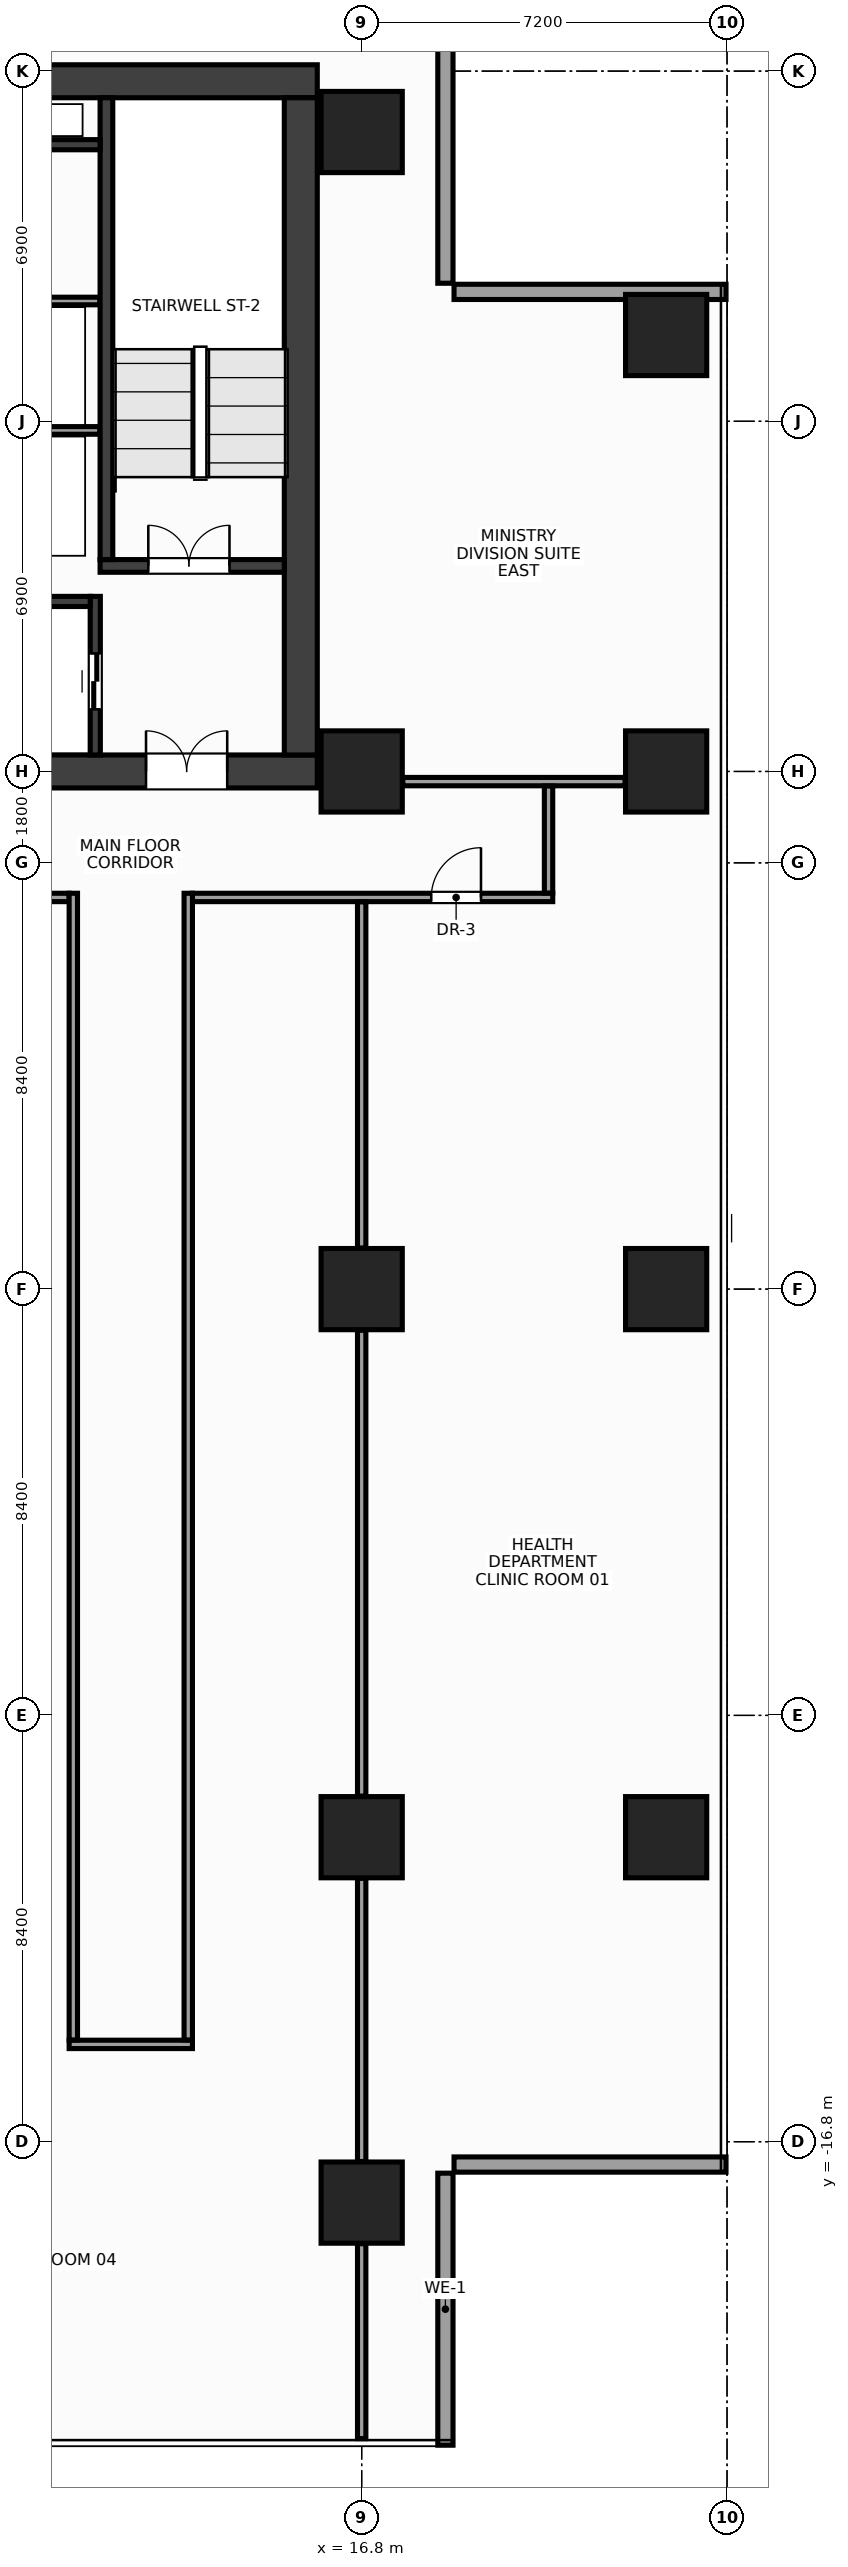
"""IFC4 building model, lengths in metres.
Left out: names, types, materials, properties, quantities, classifications, styles, units other than length and angle.
Written with IfcOpenShell. Run it as: python <this file> out.ifc"""

import sys

from ifc_helpers import new_model, si_unit, direction, frame, frame_2d, origin, origin_2d, place, context, subcontext, project, spatial, rectangle, extrude, source, transform, mapped, element, fill, save


model = new_model("IFC4")
c1 = context("Model", 3, precision=1e-05, world=origin(), true_north=direction((0.0, 1.0)))
c2 = subcontext(c1, "Body", "Model", "MODEL_VIEW")
j1 = project(units=[si_unit("LENGTHUNIT", "METRE"), si_unit("PLANEANGLEUNIT", "RADIAN")], contexts=[c1])
p1 = place(None, origin())
s1 = spatial("IfcSite", under=j1, at=p1, CompositionType="ELEMENT")
p2 = place(p1, origin())
s2 = spatial("IfcBuilding", under=s1, at=p2, CompositionType="ELEMENT")
p3 = place(p2, frame((0.0, 0.0, 156.8)))
s3 = spatial("IfcBuildingStorey", under=s2, at=p3, CompositionType="ELEMENT", Elevation=156.8)
m1 = source(origin(), c2, "Body", "SweptSolid", [
    extrude(rectangle(XDim=31.85, YDim=0.65, at=frame_2d((15.925, 0.0))), origin(), (0.0, 0.0, 1.0), 3.6),
])
p4 = place(p3, frame((-15.925, 23.8, 0.0), z_axis=(0.0, 0.0, 1.0), x_axis=(1.0, 0.0, 0.0)))
e1 = element("IfcWall", 1, at=p4, inside=s3, PredefinedType="SHEAR", context=c2, shape_type="MappedRepresentation", body=[
    mapped(m1, transform((0.0, 0.0, 0.0), x_axis=(1.0, 0.0, 0.0), y_axis=(0.0, 1.0, 0.0), z_axis=(0.0, 0.0, 1.0), scale=1.0)),
])
p5 = place(p3, frame((-15.925, 10.2, 0.0), z_axis=(0.0, 0.0, 1.0), x_axis=(1.0, 0.0, 0.0)))
e2 = element("IfcWall", 2, at=p5, inside=s3, PredefinedType="SHEAR", context=c2, shape_type="MappedRepresentation", body=[
    mapped(m1, transform((0.0, 0.0, 0.0), x_axis=(1.0, 0.0, 0.0), y_axis=(0.0, 1.0, 0.0), z_axis=(0.0, 0.0, 1.0), scale=1.0)),
])
p6 = place(p5, frame((1.775, 0.0, 0.0)))
e3 = element("IfcOpeningElement", 3, at=p6, cuts=e2, PredefinedType="OPENING", context=c2, shape_type="SweptSolid", body=[
    extrude(rectangle(XDim=1.6, YDim=2.15, at=frame_2d((0.8, 1.075))), frame((0.0, 0.337, 0.0), z_axis=(0.0, -1.0, 0.0), x_axis=(1.0, 0.0, 0.0)), (0.0, 0.0, 1.0), 0.674),
])
p7 = place(p5, frame((28.475, 0.0, 0.0)))
e4 = element("IfcOpeningElement", 4, at=p7, cuts=e2, PredefinedType="OPENING", context=c2, shape_type="SweptSolid", body=[
    extrude(rectangle(XDim=1.6, YDim=2.15, at=frame_2d((0.8, 1.075))), frame((0.0, 0.337, 0.0), z_axis=(0.0, -1.0, 0.0), x_axis=(1.0, 0.0, 0.0)), (0.0, 0.0, 1.0), 0.674),
])
p8 = place(p5, frame((15.175, 0.0, 0.0)))
e5 = element("IfcOpeningElement", 5, at=p8, cuts=e2, PredefinedType="OPENING", context=c2, shape_type="SweptSolid", body=[
    extrude(rectangle(XDim=1.5, YDim=2.2, at=frame_2d((0.75, 1.1))), frame((0.0, 0.337, 0.0), z_axis=(0.0, -1.0, 0.0), x_axis=(1.0, 0.0, 0.0)), (0.0, 0.0, 1.0), 0.674),
])
m2 = source(origin(), c2, "Body", "SweptSolid", [
    extrude(rectangle(XDim=12.95, YDim=0.65, at=frame_2d((6.475, 0.0))), origin(), (0.0, 0.0, 1.0), 3.6),
])
p9 = place(p3, frame((15.6, 10.525, 0.0), z_axis=(0.0, 0.0, 1.0), x_axis=(0.0, 1.0, 0.0)))
e6 = element("IfcWall", 6, at=p9, inside=s3, PredefinedType="SHEAR", context=c2, shape_type="MappedRepresentation", body=[
    mapped(m2, transform((0.0, 0.0, 0.0), x_axis=(1.0, 0.0, 0.0), y_axis=(0.0, 1.0, 0.0), z_axis=(0.0, 0.0, 1.0), scale=1.0)),
])
m3 = source(origin(), c2, "Body", "SweptSolid", [
    extrude(rectangle(XDim=3.63, YDim=0.25, at=frame_2d((1.815, 0.0))), origin(), (0.0, 0.0, 1.0), 3.6),
])
p10 = place(p3, frame((11.645, 14.25, 0.0), z_axis=(0.0, 0.0, 1.0), x_axis=(1.0, 0.0, 0.0)))
e7 = element("IfcWall", 7, at=p10, inside=s3, PredefinedType="SHEAR", context=c2, shape_type="MappedRepresentation", body=[
    mapped(m3, transform((0.0, 0.0, 0.0), x_axis=(1.0, 0.0, 0.0), y_axis=(0.0, 1.0, 0.0), z_axis=(0.0, 0.0, 1.0), scale=1.0)),
])
p11 = place(p10, frame((0.95, 0.0, 0.0)))
e8 = element("IfcOpeningElement", 8, at=p11, cuts=e7, PredefinedType="OPENING", context=c2, shape_type="SweptSolid", body=[
    extrude(rectangle(XDim=1.6, YDim=2.15, at=frame_2d((0.8, 1.075))), frame((0.0, 0.137, 0.0), z_axis=(0.0, -1.0, 0.0), x_axis=(1.0, 0.0, 0.0)), (0.0, 0.0, 1.0), 0.274),
])
m4 = source(origin(), c2, "Body", "SweptSolid", [
    extrude(rectangle(XDim=9.1, YDim=0.25, at=frame_2d((4.55, 0.0))), origin(), (0.0, 0.0, 1.0), 3.6),
])
p12 = place(p3, frame((11.77, 14.375, 0.0), z_axis=(0.0, 0.0, 1.0), x_axis=(0.0, 1.0, 0.0)))
e9 = element("IfcWall", 9, at=p12, inside=s3, PredefinedType="SHEAR", context=c2, shape_type="MappedRepresentation", body=[
    mapped(m4, transform((0.0, 0.0, 0.0), x_axis=(1.0, 0.0, 0.0), y_axis=(0.0, 1.0, 0.0), z_axis=(0.0, 0.0, 1.0), scale=1.0)),
])
m5 = source(origin(), c2, "Body", "SweptSolid", [
    extrude(rectangle(XDim=3.125, YDim=0.2, at=frame_2d((1.562, 0.0))), origin(), (0.0, 0.0, 1.0), 3.6),
])
p13 = place(p3, frame((11.55, 10.525, 0.0), z_axis=(0.0, 0.0, 1.0), x_axis=(0.0, 1.0, 0.0)))
e10 = element("IfcWall", 10, at=p13, inside=s3, PredefinedType="SHEAR", context=c2, shape_type="MappedRepresentation", body=[
    mapped(m5, transform((0.0, 0.0, 0.0), x_axis=(1.0, 0.0, 0.0), y_axis=(0.0, 1.0, 0.0), z_axis=(0.0, 0.0, 1.0), scale=1.0)),
])
p14 = place(p13, frame((0.9, 0.0, 0.0)))
e11 = element("IfcOpeningElement", 11, at=p14, cuts=e10, PredefinedType="OPENING", context=c2, shape_type="SweptSolid", body=[
    extrude(rectangle(XDim=1.1, YDim=2.15, at=frame_2d((0.55, 1.075))), frame((0.0, 0.112, 0.0), z_axis=(0.0, -1.0, 0.0), x_axis=(1.0, 0.0, 0.0)), (0.0, 0.0, 1.0), 0.224),
])
m6 = source(origin(), c2, "Body", "SweptSolid", [
    extrude(rectangle(XDim=2.825, YDim=0.2, at=frame_2d((1.413, 0.0))), origin(), (0.0, 0.0, 1.0), 3.6),
])
p15 = place(p3, frame((8.625, 13.55, 0.0), z_axis=(0.0, 0.0, 1.0), x_axis=(1.0, 0.0, 0.0)))
e12 = element("IfcWall", 12, at=p15, inside=s3, PredefinedType="SHEAR", context=c2, shape_type="MappedRepresentation", body=[
    mapped(m6, transform((0.0, 0.0, 0.0), x_axis=(1.0, 0.0, 0.0), y_axis=(0.0, 1.0, 0.0), z_axis=(0.0, 0.0, 1.0), scale=1.0)),
])
m7 = source(origin(), c2, "Body", "SweptSolid", [
    extrude(rectangle(XDim=3.02, YDim=0.2, at=frame_2d((1.51, 0.0))), origin(), (0.0, 0.0, 1.0), 3.6),
])
p16 = place(p3, frame((8.625, 22.55, 0.0), z_axis=(0.0, 0.0, 1.0), x_axis=(1.0, 0.0, 0.0)))
e13 = element("IfcWall", 13, at=p16, inside=s3, PredefinedType="SHEAR", context=c2, shape_type="MappedRepresentation", body=[
    mapped(m7, transform((0.0, 0.0, 0.0), x_axis=(1.0, 0.0, 0.0), y_axis=(0.0, 1.0, 0.0), z_axis=(0.0, 0.0, 1.0), scale=1.0)),
])
m8 = source(origin(), c2, "Body", "SweptSolid", [
    extrude(rectangle(XDim=1.6, YDim=1.6, at=origin_2d()), origin(), (0.0, 0.0, 1.0), 3.6),
])
for number, where, z_axis, x_axis in (
    (14, (16.8, -18.0, 0.0), (0.0, 0.0, 1.0), (1.0, 0.0, 0.0)),
    (15, (16.8, -10.8, 0.0), (0.0, 0.0, 1.0), (1.0, 0.0, 0.0)),
    (16, (16.8, 0.0, 0.0), (0.0, 0.0, 1.0), (1.0, 0.0, 0.0)),
    (17, (16.8, 10.2, 0.0), (0.0, 0.0, 1.0), (1.0, 0.0, 0.0)),
    (18, (16.8, 22.8, 0.0), (0.0, 0.0, 1.0), (1.0, 0.0, 0.0)),
    (19, (22.8, -10.8, 0.0), (0.0, 0.0, 1.0), (1.0, 0.0, 0.0)),
    (20, (22.8, 0.0, 0.0), (0.0, 0.0, 1.0), (1.0, 0.0, 0.0)),
    (21, (22.8, 10.2, 0.0), (0.0, 0.0, 1.0), (1.0, 0.0, 0.0)),
    (22, (22.8, 18.8, 0.0), (0.0, 0.0, 1.0), (1.0, 0.0, 0.0)),
):
    element("IfcColumn", number, at=place(p3, frame(where, z_axis=z_axis, x_axis=x_axis)), inside=s3, PredefinedType="COLUMN", context=c2, shape_type="MappedRepresentation", body=[
        mapped(m8, transform((0.0, 0.0, 0.0), x_axis=(1.0, 0.0, 0.0), y_axis=(0.0, 1.0, 0.0), z_axis=(0.0, 0.0, 1.0), scale=1.0)),
    ])
m9 = source(origin(), c2, "Body", "SweptSolid", [
    extrude(rectangle(XDim=5.36, YDim=0.3, at=frame_2d((2.68, 0.0))), origin(), (0.0, 0.0, 1.0), 2.76),
])
p17 = place(p3, frame((18.45, -22.78, 0.0), z_axis=(0.0, 0.0, 1.0), x_axis=(0.0, 1.0, 0.0)))
e23 = element("IfcWall", 23, at=p17, inside=s3, PredefinedType="STANDARD", context=c2, shape_type="MappedRepresentation", body=[
    mapped(m9, transform((0.0, 0.0, 0.0), x_axis=(1.0, 0.0, 0.0), y_axis=(0.0, 1.0, 0.0), z_axis=(0.0, 0.0, 1.0), scale=1.0)),
])
m10 = source(origin(), c2, "Body", "SweptSolid", [
    extrude(rectangle(XDim=5.36, YDim=0.3, at=frame_2d((2.68, 0.0))), origin(), (0.0, 0.0, 1.0), 2.76),
])
for number, where, z_axis, x_axis in (
    (24, (18.62, -17.25, 0.0), (0.0, 0.0, 1.0), (1.0, 0.0, 0.0)),
    (25, (23.98, 19.65, 0.0), (0.0, 0.0, 1.0), (-1.0, 0.0, 0.0)),
    (26, (18.45, 19.82, 0.0), (0.0, 0.0, 1.0), (0.0, 1.0, 0.0)),
):
    element("IfcWall", number, at=place(p3, frame(where, z_axis=z_axis, x_axis=x_axis)), inside=s3, PredefinedType="STANDARD", context=c2, shape_type="MappedRepresentation", body=[
        mapped(m10, transform((0.0, 0.0, 0.0), x_axis=(1.0, 0.0, 0.0), y_axis=(0.0, 1.0, 0.0), z_axis=(0.0, 0.0, 1.0), scale=1.0)),
    ])
m11 = source(origin(), c2, "Body", "SweptSolid", [
    extrude(rectangle(XDim=3.01, YDim=0.15, at=frame_2d((1.505, 0.0))), origin(), (0.0, 0.0, 1.0), 3.38),
])
for number, where, z_axis, x_axis in (
    (27, (8.63, 16.92, 0.0), (0.0, 0.0, 1.0), (1.0, 0.0, 0.0)),
    (28, (8.63, 19.47, 0.0), (0.0, 0.0, 1.0), (1.0, 0.0, 0.0)),
):
    element("IfcWall", number, at=place(p3, frame(where, z_axis=z_axis, x_axis=x_axis)), inside=s3, PredefinedType="PARTITIONING", context=c2, shape_type="MappedRepresentation", body=[
        mapped(m11, transform((0.0, 0.0, 0.0), x_axis=(1.0, 0.0, 0.0), y_axis=(0.0, 1.0, 0.0), z_axis=(0.0, 0.0, 1.0), scale=1.0)),
    ])
m12 = source(origin(), c2, "Body", "SweptSolid", [
    extrude(rectangle(XDim=4.38, YDim=0.165, at=frame_2d((2.19, 0.0))), origin(), (0.0, 0.0, 1.0), 2.915),
])
p18 = place(p3, frame((17.61, 10.0, 0.0), z_axis=(0.0, 0.0, 1.0), x_axis=(1.0, 0.0, 0.0)))
e29 = element("IfcWall", 29, at=p18, inside=s3, PredefinedType="PARTITIONING", context=c2, shape_type="MappedRepresentation", body=[
    mapped(m12, transform((0.0, 0.0, 0.0), x_axis=(1.0, 0.0, 0.0), y_axis=(0.0, 1.0, 0.0), z_axis=(0.0, 0.0, 1.0), scale=1.0)),
])
m13 = source(origin(), c2, "Body", "SweptSolid", [
    extrude(rectangle(XDim=31.6, YDim=0.165, at=frame_2d((15.8, 0.0))), origin(), (0.0, 0.0, 1.0), 2.765),
])
p19 = place(p3, frame((-20.565, 7.718, 0.0), z_axis=(0.0, 0.0, 1.0), x_axis=(1.0, 0.0, 0.0)))
e30 = element("IfcWall", 30, at=p19, inside=s3, PredefinedType="PARTITIONING", context=c2, shape_type="MappedRepresentation", body=[
    mapped(m13, transform((0.0, 0.0, 0.0), x_axis=(1.0, 0.0, 0.0), y_axis=(0.0, 1.0, 0.0), z_axis=(0.0, 0.0, 1.0), scale=1.0)),
])
p20 = place(p19, frame((2.614, 0.0, 0.0)))
e31 = element("IfcOpeningElement", 31, at=p20, cuts=e30, PredefinedType="OPENING", context=c2, shape_type="SweptSolid", body=[
    extrude(rectangle(XDim=0.98, YDim=2.15, at=frame_2d((0.49, 1.075))), frame((0.0, 0.094, 0.0), z_axis=(0.0, -1.0, 0.0), x_axis=(1.0, 0.0, 0.0)), (0.0, 0.0, 1.0), 0.189),
])
p21 = place(p19, frame((15.175, 0.0, 0.0)))
e32 = element("IfcOpeningElement", 32, at=p21, cuts=e30, PredefinedType="OPENING", context=c2, shape_type="SweptSolid", body=[
    extrude(rectangle(XDim=0.98, YDim=2.15, at=frame_2d((0.49, 1.075))), frame((0.0, 0.094, 0.0), z_axis=(0.0, -1.0, 0.0), x_axis=(1.0, 0.0, 0.0)), (0.0, 0.0, 1.0), 0.189),
])
p22 = place(p19, frame((27.874, 0.0, 0.0)))
e33 = element("IfcOpeningElement", 33, at=p22, cuts=e30, PredefinedType="OPENING", context=c2, shape_type="SweptSolid", body=[
    extrude(rectangle(XDim=0.98, YDim=2.15, at=frame_2d((0.49, 1.075))), frame((0.0, 0.094, 0.0), z_axis=(0.0, -1.0, 0.0), x_axis=(1.0, 0.0, 0.0)), (0.0, 0.0, 1.0), 0.189),
])
m14 = source(origin(), c2, "Body", "SweptSolid", [
    extrude(rectangle(XDim=7.1, YDim=0.165, at=frame_2d((3.55, 0.0))), origin(), (0.0, 0.0, 1.0), 2.765),
])
p23 = place(p3, frame((13.465, 7.718, 0.0), z_axis=(0.0, 0.0, 1.0), x_axis=(1.0, 0.0, 0.0)))
e34 = element("IfcWall", 34, at=p23, inside=s3, PredefinedType="PARTITIONING", context=c2, shape_type="MappedRepresentation", body=[
    mapped(m14, transform((0.0, 0.0, 0.0), x_axis=(1.0, 0.0, 0.0), y_axis=(0.0, 1.0, 0.0), z_axis=(0.0, 0.0, 1.0), scale=1.0)),
])
p24 = place(p23, frame((4.706, 0.0, 0.0)))
e35 = element("IfcOpeningElement", 35, at=p24, cuts=e34, PredefinedType="OPENING", context=c2, shape_type="SweptSolid", body=[
    extrude(rectangle(XDim=0.98, YDim=2.15, at=frame_2d((0.49, 1.075))), frame((0.0, 0.094, 0.0), z_axis=(0.0, -1.0, 0.0), x_axis=(1.0, 0.0, 0.0)), (0.0, 0.0, 1.0), 0.189),
])
m15 = source(origin(), c2, "Body", "SweptSolid", [
    extrude(rectangle(XDim=2.43, YDim=0.165, at=frame_2d((1.215, 0.0))), origin(), (0.0, 0.0, 1.0), 3.38),
])
p25 = place(p3, frame((11.035, -14.883, 0.0), z_axis=(0.0, 0.0, 1.0), x_axis=(1.0, 0.0, 0.0)))
e36 = element("IfcWall", 36, at=p25, inside=s3, PredefinedType="PARTITIONING", context=c2, shape_type="MappedRepresentation", body=[
    mapped(m15, transform((0.0, 0.0, 0.0), x_axis=(1.0, 0.0, 0.0), y_axis=(0.0, 1.0, 0.0), z_axis=(0.0, 0.0, 1.0), scale=1.0)),
])
m16 = source(origin(), c2, "Body", "SweptSolid", [
    extrude(rectangle(XDim=2.108, YDim=0.165, at=frame_2d((1.054, 0.0))), origin(), (0.0, 0.0, 1.0), 3.38),
])
p26 = place(p3, frame((20.482, 7.805, 0.0), z_axis=(0.0, 0.0, 1.0), x_axis=(0.0, 1.0, 0.0)))
e37 = element("IfcWall", 37, at=p26, inside=s3, PredefinedType="PARTITIONING", context=c2, shape_type="MappedRepresentation", body=[
    mapped(m16, transform((0.0, 0.0, 0.0), x_axis=(1.0, 0.0, 0.0), y_axis=(0.0, 1.0, 0.0), z_axis=(0.0, 0.0, 1.0), scale=1.0)),
])
m17 = source(origin(), c2, "Body", "SweptSolid", [
    extrude(rectangle(XDim=22.595, YDim=0.165, at=frame_2d((11.297, 0.0))), origin(), (0.0, 0.0, 1.0), 2.665),
])
for number, where, z_axis, x_axis in (
    (38, (11.117, -14.795, 0.0), (0.0, 0.0, 1.0), (0.0, 1.0, 0.0)),
    (39, (13.383, -14.795, 0.0), (0.0, 0.0, 1.0), (0.0, 1.0, 0.0)),
):
    element("IfcWall", number, at=place(p3, frame(where, z_axis=z_axis, x_axis=x_axis)), inside=s3, PredefinedType="PARTITIONING", context=c2, shape_type="MappedRepresentation", body=[
        mapped(m17, transform((0.0, 0.0, 0.0), x_axis=(1.0, 0.0, 0.0), y_axis=(0.0, 1.0, 0.0), z_axis=(0.0, 0.0, 1.0), scale=1.0)),
    ])
m18 = source(origin(), c2, "Body", "SweptSolid", [
    extrude(rectangle(XDim=3.84, YDim=0.165, at=frame_2d((1.92, 0.0))), origin(), (0.0, 0.0, 1.0), 3.38),
])
p27 = place(p3, frame((16.8, -22.65, 0.0), z_axis=(0.0, 0.0, 1.0), x_axis=(0.0, 1.0, 0.0)))
e40 = element("IfcWall", 40, at=p27, inside=s3, PredefinedType="PARTITIONING", context=c2, shape_type="MappedRepresentation", body=[
    mapped(m18, transform((0.0, 0.0, 0.0), x_axis=(1.0, 0.0, 0.0), y_axis=(0.0, 1.0, 0.0), z_axis=(0.0, 0.0, 1.0), scale=1.0)),
])
m19 = source(origin(), c2, "Body", "SweptSolid", [
    extrude(rectangle(XDim=5.58, YDim=0.165, at=frame_2d((2.79, 0.0))), origin(), (0.0, 0.0, 1.0), 2.965),
])
p28 = place(p3, frame((16.8, -17.19, 0.0), z_axis=(0.0, 0.0, 1.0), x_axis=(0.0, 1.0, 0.0)))
e41 = element("IfcWall", 41, at=p28, inside=s3, PredefinedType="PARTITIONING", context=c2, shape_type="MappedRepresentation", body=[
    mapped(m19, transform((0.0, 0.0, 0.0), x_axis=(1.0, 0.0, 0.0), y_axis=(0.0, 1.0, 0.0), z_axis=(0.0, 0.0, 1.0), scale=1.0)),
])
m20 = source(origin(), c2, "Body", "SweptSolid", [
    extrude(rectangle(XDim=9.18, YDim=0.165, at=frame_2d((4.59, 0.0))), origin(), (0.0, 0.0, 1.0), 2.765),
])
p29 = place(p3, frame((16.8, -9.99, 0.0), z_axis=(0.0, 0.0, 1.0), x_axis=(0.0, 1.0, 0.0)))
e42 = element("IfcWall", 42, at=p29, inside=s3, PredefinedType="PARTITIONING", context=c2, shape_type="MappedRepresentation", body=[
    mapped(m20, transform((0.0, 0.0, 0.0), x_axis=(1.0, 0.0, 0.0), y_axis=(0.0, 1.0, 0.0), z_axis=(0.0, 0.0, 1.0), scale=1.0)),
])
m21 = source(origin(), c2, "Body", "SweptSolid", [
    extrude(rectangle(XDim=6.82, YDim=0.165, at=frame_2d((3.41, 0.0))), origin(), (0.0, 0.0, 1.0), 2.765),
])
p30 = place(p3, frame((16.8, 0.81, 0.0), z_axis=(0.0, 0.0, 1.0), x_axis=(0.0, 1.0, 0.0)))
e43 = element("IfcWall", 43, at=p30, inside=s3, PredefinedType="PARTITIONING", context=c2, shape_type="MappedRepresentation", body=[
    mapped(m21, transform((0.0, 0.0, 0.0), x_axis=(1.0, 0.0, 0.0), y_axis=(0.0, 1.0, 0.0), z_axis=(0.0, 0.0, 1.0), scale=1.0)),
])
m22 = source(origin(), c2, "Body", "SweptSolid", [
    extrude(rectangle(XDim=1.6, YDim=2.15, at=frame_2d((0.8, 1.075))), frame((0.0, 0.025, 0.0), z_axis=(0.0, -1.0, 0.0), x_axis=(1.0, 0.0, 0.0)), (0.0, 0.0, 1.0), 0.05),
])
p31 = place(p11, origin())
e44 = element("IfcDoor", 44, at=p31, inside=s3, OperationType="DOUBLE_DOOR_SINGLE_SWING", PredefinedType="DOOR", context=c2, shape_type="MappedRepresentation", body=[
    mapped(m22, transform((0.0, 0.0, 0.0), x_axis=(1.0, 0.0, 0.0), y_axis=(0.0, 1.0, 0.0), z_axis=(0.0, 0.0, 1.0), scale=1.0)),
])
fill(e8, e44)
p32 = place(p7, origin())
e45 = element("IfcDoor", 45, at=p32, inside=s3, OperationType="DOUBLE_DOOR_SINGLE_SWING", PredefinedType="DOOR", context=c2, shape_type="MappedRepresentation", body=[
    mapped(m22, transform((0.0, 0.0, 0.0), x_axis=(1.0, 0.0, 0.0), y_axis=(0.0, 1.0, 0.0), z_axis=(0.0, 0.0, 1.0), scale=1.0)),
])
fill(e4, e45)
m23 = source(origin(), c2, "Body", "SweptSolid", [
    extrude(rectangle(XDim=1.1, YDim=2.15, at=frame_2d((0.55, 1.075))), frame((0.0, 0.025, 0.0), z_axis=(0.0, -1.0, 0.0), x_axis=(1.0, 0.0, 0.0)), (0.0, 0.0, 1.0), 0.05),
])
p33 = place(p14, origin())
e46 = element("IfcDoor", 46, at=p33, inside=s3, OperationType="DOUBLE_DOOR_SLIDING", PredefinedType="DOOR", context=c2, shape_type="MappedRepresentation", body=[
    mapped(m23, transform((0.0, 0.0, 0.0), x_axis=(1.0, 0.0, 0.0), y_axis=(0.0, 1.0, 0.0), z_axis=(0.0, 0.0, 1.0), scale=1.0)),
])
fill(e11, e46)
m24 = source(origin(), c2, "Body", "SweptSolid", [
    extrude(rectangle(XDim=0.98, YDim=2.15, at=frame_2d((0.49, 1.075))), frame((0.0, 0.025, 0.0), z_axis=(0.0, -1.0, 0.0), x_axis=(1.0, 0.0, 0.0)), (0.0, 0.0, 1.0), 0.05),
])
p34 = place(p24, origin())
e47 = element("IfcDoor", 47, at=p34, inside=s3, OperationType="SINGLE_SWING_RIGHT", PredefinedType="DOOR", context=c2, shape_type="MappedRepresentation", body=[
    mapped(m24, transform((0.0, 0.0, 0.0), x_axis=(1.0, 0.0, 0.0), y_axis=(0.0, 1.0, 0.0), z_axis=(0.0, 0.0, 1.0), scale=1.0)),
])
fill(e35, e47)
save(model, sys.argv[1])
